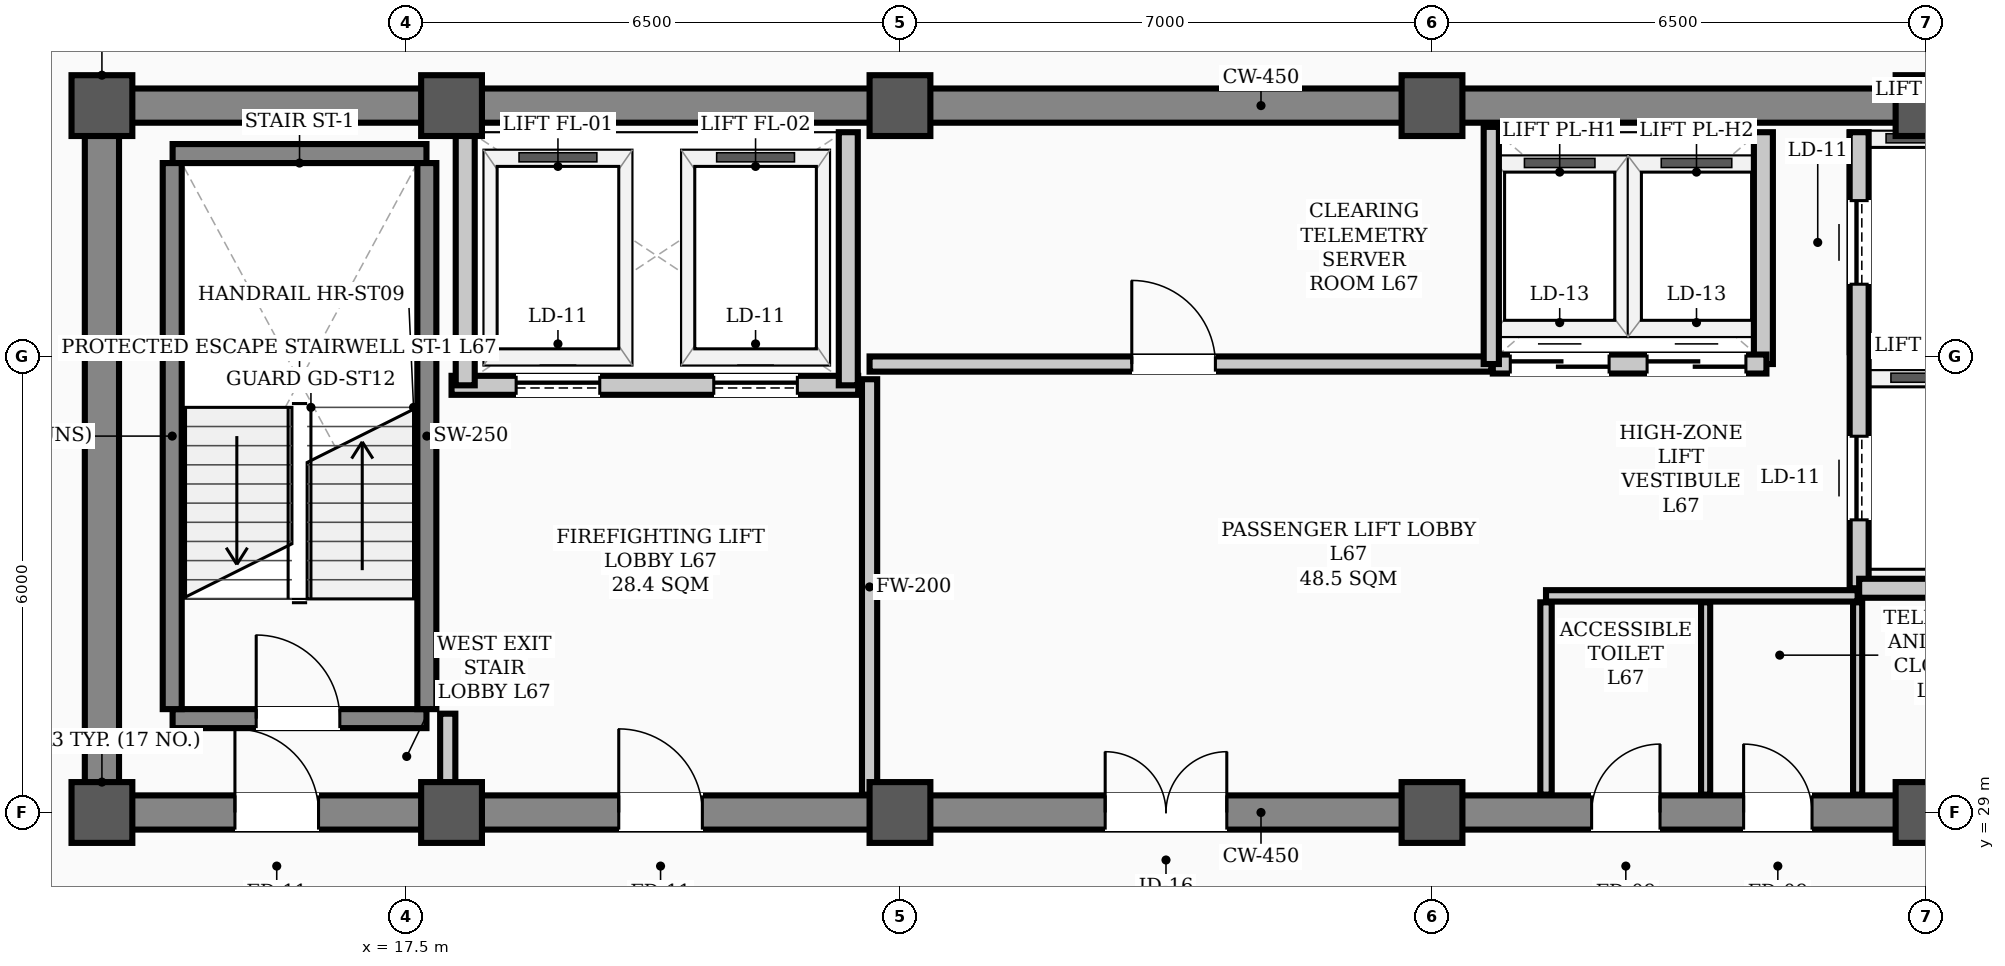
"""IFC4 building model, lengths in metres.
Left out: names, types, materials, properties, quantities, classifications, styles, units other than length and angle.
Written with IfcOpenShell. Run it as: python <this file> out.ifc"""

import sys

from ifc_helpers import new_model, si_unit, direction, frame, frame_2d, origin, origin_2d, place, context, subcontext, project, spatial, rectangle, hollow_rectangle, extrude, element, fill, save


model = new_model("IFC4")
c1 = context("Model", 3, precision=1e-05, world=origin(), true_north=direction((0.0, 1.0)))
c2 = subcontext(c1, "Body", "Model", "MODEL_VIEW")
j1 = project(units=[si_unit("LENGTHUNIT", "METRE"), si_unit("PLANEANGLEUNIT", "RADIAN")], contexts=[c1])
p1 = place(None, origin())
s1 = spatial("IfcSite", under=j1, at=p1, CompositionType="ELEMENT")
p2 = place(p1, origin())
s2 = spatial("IfcBuilding", under=s1, at=p2, CompositionType="ELEMENT")
p3 = place(p2, frame((0.0, 0.0, 269.6)))
s3 = spatial("IfcBuildingStorey", under=s2, at=p3, CompositionType="ELEMENT", Elevation=269.6)
for number, where, z_axis, x_axis in (
    (1, (13.5, 29.0, 0.0), (0.0, 0.0, 1.0), (1.0, 0.0, 0.0)),
    (2, (13.5, 38.3, 0.0), (0.0, 0.0, 1.0), (1.0, 0.0, 0.0)),
    (3, (18.1, 29.0, 0.0), (0.0, 0.0, 1.0), (1.0, 0.0, 0.0)),
    (4, (18.1, 38.3, 0.0), (0.0, 0.0, 1.0), (1.0, 0.0, 0.0)),
    (5, (24.0, 29.0, 0.0), (0.0, 0.0, 1.0), (1.0, 0.0, 0.0)),
    (6, (24.0, 38.3, 0.0), (0.0, 0.0, 1.0), (1.0, 0.0, 0.0)),
    (7, (31.0, 29.0, 0.0), (0.0, 0.0, 1.0), (1.0, 0.0, 0.0)),
    (8, (31.0, 38.3, 0.0), (0.0, 0.0, 1.0), (1.0, 0.0, 0.0)),
    (9, (37.5, 29.0, 0.0), (0.0, 0.0, 1.0), (1.0, 0.0, 0.0)),
    (10, (37.5, 38.3, 0.0), (0.0, 0.0, 1.0), (1.0, 0.0, 0.0)),
):
    element("IfcColumn", number, at=place(p3, frame(where, z_axis=z_axis, x_axis=x_axis)), inside=s3, PredefinedType="COLUMN", context=c2, shape_type="SweptSolid", body=[
        extrude(hollow_rectangle(XDim=0.8, YDim=0.8, WallThickness=0.032, InnerFilletRadius=0.016, OuterFilletRadius=0.048, at=origin_2d()), origin(), (0.0, 0.0, 1.0), 3.9),
    ])
p4 = place(p3, frame((13.5, 29.0, 0.0), z_axis=(0.0, 0.0, 1.0), x_axis=(1.0, 0.0, 0.0)))
e11 = element("IfcWall", 11, at=p4, inside=s3, PredefinedType="SHEAR", context=c2, shape_type="SweptSolid", body=[
    extrude(rectangle(XDim=30.5, YDim=0.45, at=frame_2d((15.25, 0.0))), origin(), (0.0, 0.0, 1.0), 3.72),
])
p5 = place(p4, frame((1.75, 0.0, 0.0)))
e12 = element("IfcOpeningElement", 12, at=p5, cuts=e11, PredefinedType="OPENING", context=c2, shape_type="SweptSolid", body=[
    extrude(rectangle(XDim=1.1, YDim=2.08, at=frame_2d((0.55, 1.04))), frame((0.0, 0.235, 0.0), z_axis=(0.0, -1.0, 0.0), x_axis=(1.0, 0.0, 0.0)), (0.0, 0.0, 1.0), 0.47),
])
p6 = place(p4, frame((26.7, 0.0, 0.0)))
e13 = element("IfcOpeningElement", 13, at=p6, cuts=e11, PredefinedType="OPENING", context=c2, shape_type="SweptSolid", body=[
    extrude(rectangle(XDim=1.1, YDim=2.08, at=frame_2d((0.55, 1.04))), frame((0.0, 0.235, 0.0), z_axis=(0.0, -1.0, 0.0), x_axis=(1.0, 0.0, 0.0)), (0.0, 0.0, 1.0), 0.47),
])
p7 = place(p4, frame((6.8, 0.0, 0.0)))
e14 = element("IfcOpeningElement", 14, at=p7, cuts=e11, PredefinedType="OPENING", context=c2, shape_type="SweptSolid", body=[
    extrude(rectangle(XDim=1.1, YDim=2.08, at=frame_2d((0.55, 1.04))), frame((0.0, 0.235, 0.0), z_axis=(0.0, -1.0, 0.0), x_axis=(1.0, 0.0, 0.0)), (0.0, 0.0, 1.0), 0.47),
])
p8 = place(p4, frame((13.2, 0.0, 0.0)))
e15 = element("IfcOpeningElement", 15, at=p8, cuts=e11, PredefinedType="OPENING", context=c2, shape_type="SweptSolid", body=[
    extrude(rectangle(XDim=1.6, YDim=2.08, at=frame_2d((0.8, 1.04))), frame((0.0, 0.235, 0.0), z_axis=(0.0, -1.0, 0.0), x_axis=(1.0, 0.0, 0.0)), (0.0, 0.0, 1.0), 0.47),
])
p9 = place(p4, frame((19.6, 0.0, 0.0)))
e16 = element("IfcOpeningElement", 16, at=p9, cuts=e11, PredefinedType="OPENING", context=c2, shape_type="SweptSolid", body=[
    extrude(rectangle(XDim=0.9, YDim=2.08, at=frame_2d((0.45, 1.04))), frame((0.0, 0.235, 0.0), z_axis=(0.0, -1.0, 0.0), x_axis=(1.0, 0.0, 0.0)), (0.0, 0.0, 1.0), 0.47),
])
p10 = place(p4, frame((21.6, 0.0, 0.0)))
e17 = element("IfcOpeningElement", 17, at=p10, cuts=e11, PredefinedType="OPENING", context=c2, shape_type="SweptSolid", body=[
    extrude(rectangle(XDim=0.9, YDim=2.08, at=frame_2d((0.45, 1.04))), frame((0.0, 0.235, 0.0), z_axis=(0.0, -1.0, 0.0), x_axis=(1.0, 0.0, 0.0)), (0.0, 0.0, 1.0), 0.47),
])
p11 = place(p3, frame((13.5, 38.3, 0.0), z_axis=(0.0, 0.0, 1.0), x_axis=(1.0, 0.0, 0.0)))
e18 = element("IfcWall", 18, at=p11, inside=s3, PredefinedType="SHEAR", context=c2, shape_type="SweptSolid", body=[
    extrude(rectangle(XDim=30.5, YDim=0.45, at=frame_2d((15.25, 0.0))), origin(), (0.0, 0.0, 1.0), 3.72),
])
p12 = place(p3, frame((13.5, 29.35, 0.0), z_axis=(0.0, 0.0, 1.0), x_axis=(0.0, 1.0, 0.0)))
e19 = element("IfcWall", 19, at=p12, inside=s3, PredefinedType="SHEAR", context=c2, shape_type="SweptSolid", body=[
    extrude(rectangle(XDim=8.6, YDim=0.45, at=frame_2d((4.3, 0.0))), origin(), (0.0, 0.0, 1.0), 3.72),
])
p13 = place(p3, frame((14.43, 30.235, 0.0), z_axis=(0.0, 0.0, 1.0), x_axis=(1.0, 0.0, 0.0)))
e20 = element("IfcWall", 20, at=p13, inside=s3, PredefinedType="STANDARD", context=c2, shape_type="SweptSolid", body=[
    extrude(rectangle(XDim=3.34, YDim=0.25, at=frame_2d((1.67, 0.0))), origin(), (0.0, 0.0, 1.0), 3.72),
])
p14 = place(p13, frame((1.1, 0.0, 0.0)))
e21 = element("IfcOpeningElement", 21, at=p14, cuts=e20, PredefinedType="OPENING", context=c2, shape_type="SweptSolid", body=[
    extrude(rectangle(XDim=1.1, YDim=2.08, at=frame_2d((0.55, 1.04))), frame((0.0, 0.135, 0.0), z_axis=(0.0, -1.0, 0.0), x_axis=(1.0, 0.0, 0.0)), (0.0, 0.0, 1.0), 0.27),
])
p15 = place(p3, frame((14.43, 37.669, 0.0), z_axis=(0.0, 0.0, 1.0), x_axis=(1.0, 0.0, 0.0)))
e22 = element("IfcWall", 22, at=p15, inside=s3, PredefinedType="STANDARD", context=c2, shape_type="SweptSolid", body=[
    extrude(rectangle(XDim=3.34, YDim=0.25, at=frame_2d((1.67, 0.0))), origin(), (0.0, 0.0, 1.0), 3.72),
])
for number, where, z_axis, x_axis in (
    (23, (14.425, 30.36, 0.0), (0.0, 0.0, 1.0), (0.0, 1.0, 0.0)),
    (24, (17.775, 30.36, 0.0), (0.0, 0.0, 1.0), (0.0, 1.0, 0.0)),
):
    element("IfcWall", number, at=place(p3, frame(where, z_axis=z_axis, x_axis=x_axis)), inside=s3, PredefinedType="STANDARD", context=c2, shape_type="SweptSolid", body=[
        extrude(rectangle(XDim=7.184, YDim=0.25, at=frame_2d((3.592, 0.0))), origin(), (0.0, 0.0, 1.0), 3.72),
    ])
p16 = place(p3, frame((18.1, 34.62, 0.0), z_axis=(0.0, 0.0, 1.0), x_axis=(1.0, 0.0, 0.0)))
e25 = element("IfcWall", 25, at=p16, inside=s3, PredefinedType="STANDARD", context=c2, shape_type="SweptSolid", body=[
    extrude(rectangle(XDim=5.35, YDim=0.25, at=frame_2d((2.675, 0.0))), origin(), (0.0, 0.0, 1.0), 3.72),
])
p17 = place(p16, frame((0.85, 0.0, 0.0)))
e26 = element("IfcOpeningElement", 26, at=p17, cuts=e25, PredefinedType="OPENING", context=c2, shape_type="SweptSolid", body=[
    extrude(rectangle(XDim=1.1, YDim=2.08, at=frame_2d((0.55, 1.04))), frame((0.0, 0.135, 0.0), z_axis=(0.0, -1.0, 0.0), x_axis=(1.0, 0.0, 0.0)), (0.0, 0.0, 1.0), 0.27),
])
p18 = place(p16, frame((3.45, 0.0, 0.0)))
e27 = element("IfcOpeningElement", 27, at=p18, cuts=e25, PredefinedType="OPENING", context=c2, shape_type="SweptSolid", body=[
    extrude(rectangle(XDim=1.1, YDim=2.08, at=frame_2d((0.55, 1.04))), frame((0.0, 0.135, 0.0), z_axis=(0.0, -1.0, 0.0), x_axis=(1.0, 0.0, 0.0)), (0.0, 0.0, 1.0), 0.27),
])
p19 = place(p3, frame((36.62, 31.95, 0.0), z_axis=(0.0, 0.0, 1.0), x_axis=(0.0, 1.0, 0.0)))
e28 = element("IfcWall", 28, at=p19, inside=s3, PredefinedType="STANDARD", context=c2, shape_type="SweptSolid", body=[
    extrude(rectangle(XDim=6.0, YDim=0.25, at=frame_2d((3.0, 0.0))), origin(), (0.0, 0.0, 1.0), 3.4),
])
p20 = place(p19, frame((0.9, 0.0, 0.0)))
e29 = element("IfcOpeningElement", 29, at=p20, cuts=e28, PredefinedType="OPENING", context=c2, shape_type="SweptSolid", body=[
    extrude(rectangle(XDim=1.1, YDim=2.08, at=frame_2d((0.55, 1.04))), frame((0.0, 0.135, 0.0), z_axis=(0.0, -1.0, 0.0), x_axis=(1.0, 0.0, 0.0)), (0.0, 0.0, 1.0), 0.27),
])
p21 = place(p19, frame((4.0, 0.0, 0.0)))
e30 = element("IfcOpeningElement", 30, at=p21, cuts=e28, PredefinedType="OPENING", context=c2, shape_type="SweptSolid", body=[
    extrude(rectangle(XDim=1.1, YDim=2.08, at=frame_2d((0.55, 1.04))), frame((0.0, 0.135, 0.0), z_axis=(0.0, -1.0, 0.0), x_axis=(1.0, 0.0, 0.0)), (0.0, 0.0, 1.0), 0.27),
])
p22 = place(p3, frame((36.62, 31.95, 0.0), z_axis=(0.0, 0.0, 1.0), x_axis=(1.0, 0.0, 0.0)))
e31 = element("IfcWall", 31, at=p22, inside=s3, PredefinedType="STANDARD", context=c2, shape_type="SweptSolid", body=[
    extrude(rectangle(XDim=1.9, YDim=0.25, at=frame_2d((0.95, 0.0))), origin(), (0.0, 0.0, 1.0), 3.48),
])
for number, where, z_axis, x_axis in (
    (32, (18.28, 34.62, 0.0), (0.0, 0.0, 1.0), (0.0, 1.0, 0.0)),
    (33, (23.32, 34.62, 0.0), (0.0, 0.0, 1.0), (0.0, 1.0, 0.0)),
):
    element("IfcWall", number, at=place(p3, frame(where, z_axis=z_axis, x_axis=x_axis)), inside=s3, PredefinedType="STANDARD", context=c2, shape_type="SweptSolid", body=[
        extrude(rectangle(XDim=3.33, YDim=0.25, at=frame_2d((1.665, 0.0))), origin(), (0.0, 0.0, 1.0), 3.4),
    ])
p23 = place(p3, frame((35.36, 34.9, 0.0), z_axis=(0.0, 0.0, 1.0), x_axis=(0.0, 1.0, 0.0)))
e34 = element("IfcWall", 34, at=p23, inside=s3, PredefinedType="STANDARD", context=c2, shape_type="SweptSolid", body=[
    extrude(rectangle(XDim=3.05, YDim=0.25, at=frame_2d((1.525, 0.0))), origin(), (0.0, 0.0, 1.0), 3.4),
])
p24 = place(p3, frame((31.8, 34.9, 0.0), z_axis=(0.0, 0.0, 1.0), x_axis=(1.0, 0.0, 0.0)))
e35 = element("IfcWall", 35, at=p24, inside=s3, PredefinedType="STANDARD", context=c2, shape_type="SweptSolid", body=[
    extrude(rectangle(XDim=3.6, YDim=0.25, at=frame_2d((1.8, 0.0))), origin(), (0.0, 0.0, 1.0), 3.72),
])
p25 = place(p24, frame((0.23, 0.0, 0.0)))
e36 = element("IfcOpeningElement", 36, at=p25, cuts=e35, PredefinedType="OPENING", context=c2, shape_type="SweptSolid", body=[
    extrude(rectangle(XDim=1.3, YDim=2.08, at=frame_2d((0.65, 1.04))), frame((0.0, 0.135, 0.0), z_axis=(0.0, -1.0, 0.0), x_axis=(1.0, 0.0, 0.0)), (0.0, 0.0, 1.0), 0.27),
])
p26 = place(p24, frame((2.03, 0.0, 0.0)))
e37 = element("IfcOpeningElement", 37, at=p26, cuts=e35, PredefinedType="OPENING", context=c2, shape_type="SweptSolid", body=[
    extrude(rectangle(XDim=1.3, YDim=2.08, at=frame_2d((0.65, 1.04))), frame((0.0, 0.135, 0.0), z_axis=(0.0, -1.0, 0.0), x_axis=(1.0, 0.0, 0.0)), (0.0, 0.0, 1.0), 0.27),
])
p27 = place(p3, frame((23.6, 34.9, 0.0), z_axis=(0.0, 0.0, 1.0), x_axis=(1.0, 0.0, 0.0)))
e38 = element("IfcWall", 38, at=p27, inside=s3, PredefinedType="STANDARD", context=c2, shape_type="SweptSolid", body=[
    extrude(rectangle(XDim=8.18, YDim=0.2, at=frame_2d((4.09, 0.0))), origin(), (0.0, 0.0, 1.0), 3.72),
])
p28 = place(p27, frame((3.45, 0.0, 0.0)))
e39 = element("IfcOpeningElement", 39, at=p28, cuts=e38, PredefinedType="OPENING", context=c2, shape_type="SweptSolid", body=[
    extrude(rectangle(XDim=1.1, YDim=2.08, at=frame_2d((0.55, 1.04))), frame((0.0, 0.11, 0.0), z_axis=(0.0, -1.0, 0.0), x_axis=(1.0, 0.0, 0.0)), (0.0, 0.0, 1.0), 0.22),
])
p29 = place(p3, frame((32.5, 31.85, 0.0), z_axis=(0.0, 0.0, 1.0), x_axis=(1.0, 0.0, 0.0)))
e40 = element("IfcWall", 40, at=p29, inside=s3, PredefinedType="PARTITIONING", context=c2, shape_type="SweptSolid", body=[
    extrude(rectangle(XDim=4.1, YDim=0.15, at=frame_2d((2.05, 0.0))), origin(), (0.0, 0.0, 1.0), 3.72),
])
p30 = place(p3, frame((18.05, 29.235, 0.0), z_axis=(0.0, 0.0, 1.0), x_axis=(0.0, 1.0, 0.0)))
e41 = element("IfcWall", 41, at=p30, inside=s3, PredefinedType="STANDARD", context=c2, shape_type="SweptSolid", body=[
    extrude(rectangle(XDim=1.065, YDim=0.2, at=frame_2d((0.532, 0.0))), origin(), (0.0, 0.0, 1.0), 3.4),
])
p31 = place(p3, frame((23.6, 29.235, 0.0), z_axis=(0.0, 0.0, 1.0), x_axis=(0.0, 1.0, 0.0)))
e42 = element("IfcWall", 42, at=p31, inside=s3, PredefinedType="STANDARD", context=c2, shape_type="SweptSolid", body=[
    extrude(rectangle(XDim=5.465, YDim=0.2, at=frame_2d((2.732, 0.0))), origin(), (0.0, 0.0, 1.0), 3.2),
])
p32 = place(p3, frame((32.5, 29.235, 0.0), z_axis=(0.0, 0.0, 1.0), x_axis=(0.0, 1.0, 0.0)))
e43 = element("IfcWall", 43, at=p32, inside=s3, PredefinedType="PARTITIONING", context=c2, shape_type="SweptSolid", body=[
    extrude(rectangle(XDim=2.53, YDim=0.15, at=frame_2d((1.265, 0.0))), origin(), (0.0, 0.0, 1.0), 3.4),
])
for number, where, z_axis, x_axis in (
    (44, (36.6, 29.235, 0.0), (0.0, 0.0, 1.0), (0.0, 1.0, 0.0)),
    (45, (34.6, 29.235, 0.0), (0.0, 0.0, 1.0), (0.0, 1.0, 0.0)),
):
    element("IfcWall", number, at=place(p3, frame(where, z_axis=z_axis, x_axis=x_axis)), inside=s3, PredefinedType="PARTITIONING", context=c2, shape_type="SweptSolid", body=[
        extrude(rectangle(XDim=2.53, YDim=0.12, at=frame_2d((1.265, 0.0))), origin(), (0.0, 0.0, 1.0), 3.4),
    ])
p33 = place(p3, frame((31.78, 34.9, 0.0), z_axis=(0.0, 0.0, 1.0), x_axis=(0.0, 1.0, 0.0)))
e46 = element("IfcWall", 46, at=p33, inside=s3, PredefinedType="STANDARD", context=c2, shape_type="SweptSolid", body=[
    extrude(rectangle(XDim=3.12, YDim=0.2, at=frame_2d((1.56, 0.0))), origin(), (0.0, 0.0, 1.0), 3.4),
])
p34 = place(p14, origin())
e47 = element("IfcDoor", 47, at=p34, inside=s3, OperationType="SINGLE_SWING_LEFT", PredefinedType="DOOR", context=c2, shape_type="SweptSolid", body=[
    extrude(rectangle(XDim=1.1, YDim=2.08, at=frame_2d((0.55, 1.04))), frame((0.0, 0.025, 0.0), z_axis=(0.0, -1.0, 0.0), x_axis=(1.0, 0.0, 0.0)), (0.0, 0.0, 1.0), 0.05),
])
fill(e21, e47)
p35 = place(p5, origin())
e48 = element("IfcDoor", 48, at=p35, inside=s3, OperationType="SINGLE_SWING_LEFT", PredefinedType="DOOR", context=c2, shape_type="SweptSolid", body=[
    extrude(rectangle(XDim=1.1, YDim=2.08, at=frame_2d((0.55, 1.04))), frame((0.0, 0.025, 0.0), z_axis=(0.0, -1.0, 0.0), x_axis=(1.0, 0.0, 0.0)), (0.0, 0.0, 1.0), 0.05),
])
fill(e12, e48)
p36 = place(p7, origin())
e49 = element("IfcDoor", 49, at=p36, inside=s3, OperationType="SINGLE_SWING_LEFT", PredefinedType="DOOR", context=c2, shape_type="SweptSolid", body=[
    extrude(rectangle(XDim=1.1, YDim=2.08, at=frame_2d((0.55, 1.04))), frame((0.0, 0.025, 0.0), z_axis=(0.0, -1.0, 0.0), x_axis=(1.0, 0.0, 0.0)), (0.0, 0.0, 1.0), 0.05),
])
fill(e14, e49)
p37 = place(p8, origin())
e50 = element("IfcDoor", 50, at=p37, inside=s3, OperationType="DOUBLE_DOOR_SINGLE_SWING", PredefinedType="DOOR", context=c2, shape_type="SweptSolid", body=[
    extrude(rectangle(XDim=1.6, YDim=2.08, at=frame_2d((0.8, 1.04))), frame((0.0, 0.025, 0.0), z_axis=(0.0, -1.0, 0.0), x_axis=(1.0, 0.0, 0.0)), (0.0, 0.0, 1.0), 0.05),
])
fill(e15, e50)
p38 = place(p28, origin())
e51 = element("IfcDoor", 51, at=p38, inside=s3, OperationType="SINGLE_SWING_LEFT", PredefinedType="DOOR", context=c2, shape_type="SweptSolid", body=[
    extrude(rectangle(XDim=1.1, YDim=2.08, at=frame_2d((0.55, 1.04))), frame((0.0, 0.025, 0.0), z_axis=(0.0, -1.0, 0.0), x_axis=(1.0, 0.0, 0.0)), (0.0, 0.0, 1.0), 0.05),
])
fill(e39, e51)
p39 = place(p9, origin())
e52 = element("IfcDoor", 52, at=p39, inside=s3, OperationType="SINGLE_SWING_RIGHT", PredefinedType="DOOR", context=c2, shape_type="SweptSolid", body=[
    extrude(rectangle(XDim=0.9, YDim=2.08, at=frame_2d((0.45, 1.04))), frame((0.0, 0.025, 0.0), z_axis=(0.0, -1.0, 0.0), x_axis=(1.0, 0.0, 0.0)), (0.0, 0.0, 1.0), 0.05),
])
fill(e16, e52)
p40 = place(p10, origin())
e53 = element("IfcDoor", 53, at=p40, inside=s3, OperationType="SINGLE_SWING_LEFT", PredefinedType="DOOR", context=c2, shape_type="SweptSolid", body=[
    extrude(rectangle(XDim=0.9, YDim=2.08, at=frame_2d((0.45, 1.04))), frame((0.0, 0.025, 0.0), z_axis=(0.0, -1.0, 0.0), x_axis=(1.0, 0.0, 0.0)), (0.0, 0.0, 1.0), 0.05),
])
fill(e17, e53)
p41 = place(p17, origin())
e54 = element("IfcDoor", 54, at=p41, inside=s3, OperationType="SLIDING_TO_LEFT", PredefinedType="DOOR", context=c2, shape_type="SweptSolid", body=[
    extrude(rectangle(XDim=1.1, YDim=2.08, at=frame_2d((0.55, 1.04))), frame((0.0, 0.025, 0.0), z_axis=(0.0, -1.0, 0.0), x_axis=(1.0, 0.0, 0.0)), (0.0, 0.0, 1.0), 0.05),
])
fill(e26, e54)
p42 = place(p18, origin())
e55 = element("IfcDoor", 55, at=p42, inside=s3, OperationType="SLIDING_TO_LEFT", PredefinedType="DOOR", context=c2, shape_type="SweptSolid", body=[
    extrude(rectangle(XDim=1.1, YDim=2.08, at=frame_2d((0.55, 1.04))), frame((0.0, 0.025, 0.0), z_axis=(0.0, -1.0, 0.0), x_axis=(1.0, 0.0, 0.0)), (0.0, 0.0, 1.0), 0.05),
])
fill(e27, e55)
p43 = place(p20, origin())
e56 = element("IfcDoor", 56, at=p43, inside=s3, OperationType="SLIDING_TO_LEFT", PredefinedType="DOOR", context=c2, shape_type="SweptSolid", body=[
    extrude(rectangle(XDim=1.1, YDim=2.08, at=frame_2d((0.55, 1.04))), frame((0.0, 0.025, 0.0), z_axis=(0.0, -1.0, 0.0), x_axis=(1.0, 0.0, 0.0)), (0.0, 0.0, 1.0), 0.05),
])
fill(e29, e56)
p44 = place(p21, origin())
e57 = element("IfcDoor", 57, at=p44, inside=s3, OperationType="SLIDING_TO_LEFT", PredefinedType="DOOR", context=c2, shape_type="SweptSolid", body=[
    extrude(rectangle(XDim=1.1, YDim=2.08, at=frame_2d((0.55, 1.04))), frame((0.0, 0.025, 0.0), z_axis=(0.0, -1.0, 0.0), x_axis=(1.0, 0.0, 0.0)), (0.0, 0.0, 1.0), 0.05),
])
fill(e30, e57)
p45 = place(p25, origin())
e58 = element("IfcDoor", 58, at=p45, inside=s3, OperationType="DOUBLE_DOOR_SLIDING", PredefinedType="DOOR", context=c2, shape_type="SweptSolid", body=[
    extrude(rectangle(XDim=1.3, YDim=2.08, at=frame_2d((0.65, 1.04))), frame((0.0, 0.025, 0.0), z_axis=(0.0, -1.0, 0.0), x_axis=(1.0, 0.0, 0.0)), (0.0, 0.0, 1.0), 0.05),
])
fill(e36, e58)
p46 = place(p26, origin())
e59 = element("IfcDoor", 59, at=p46, inside=s3, OperationType="DOUBLE_DOOR_SLIDING", PredefinedType="DOOR", context=c2, shape_type="SweptSolid", body=[
    extrude(rectangle(XDim=1.3, YDim=2.08, at=frame_2d((0.65, 1.04))), frame((0.0, 0.025, 0.0), z_axis=(0.0, -1.0, 0.0), x_axis=(1.0, 0.0, 0.0)), (0.0, 0.0, 1.0), 0.05),
])
fill(e37, e59)
save(model, sys.argv[1])
